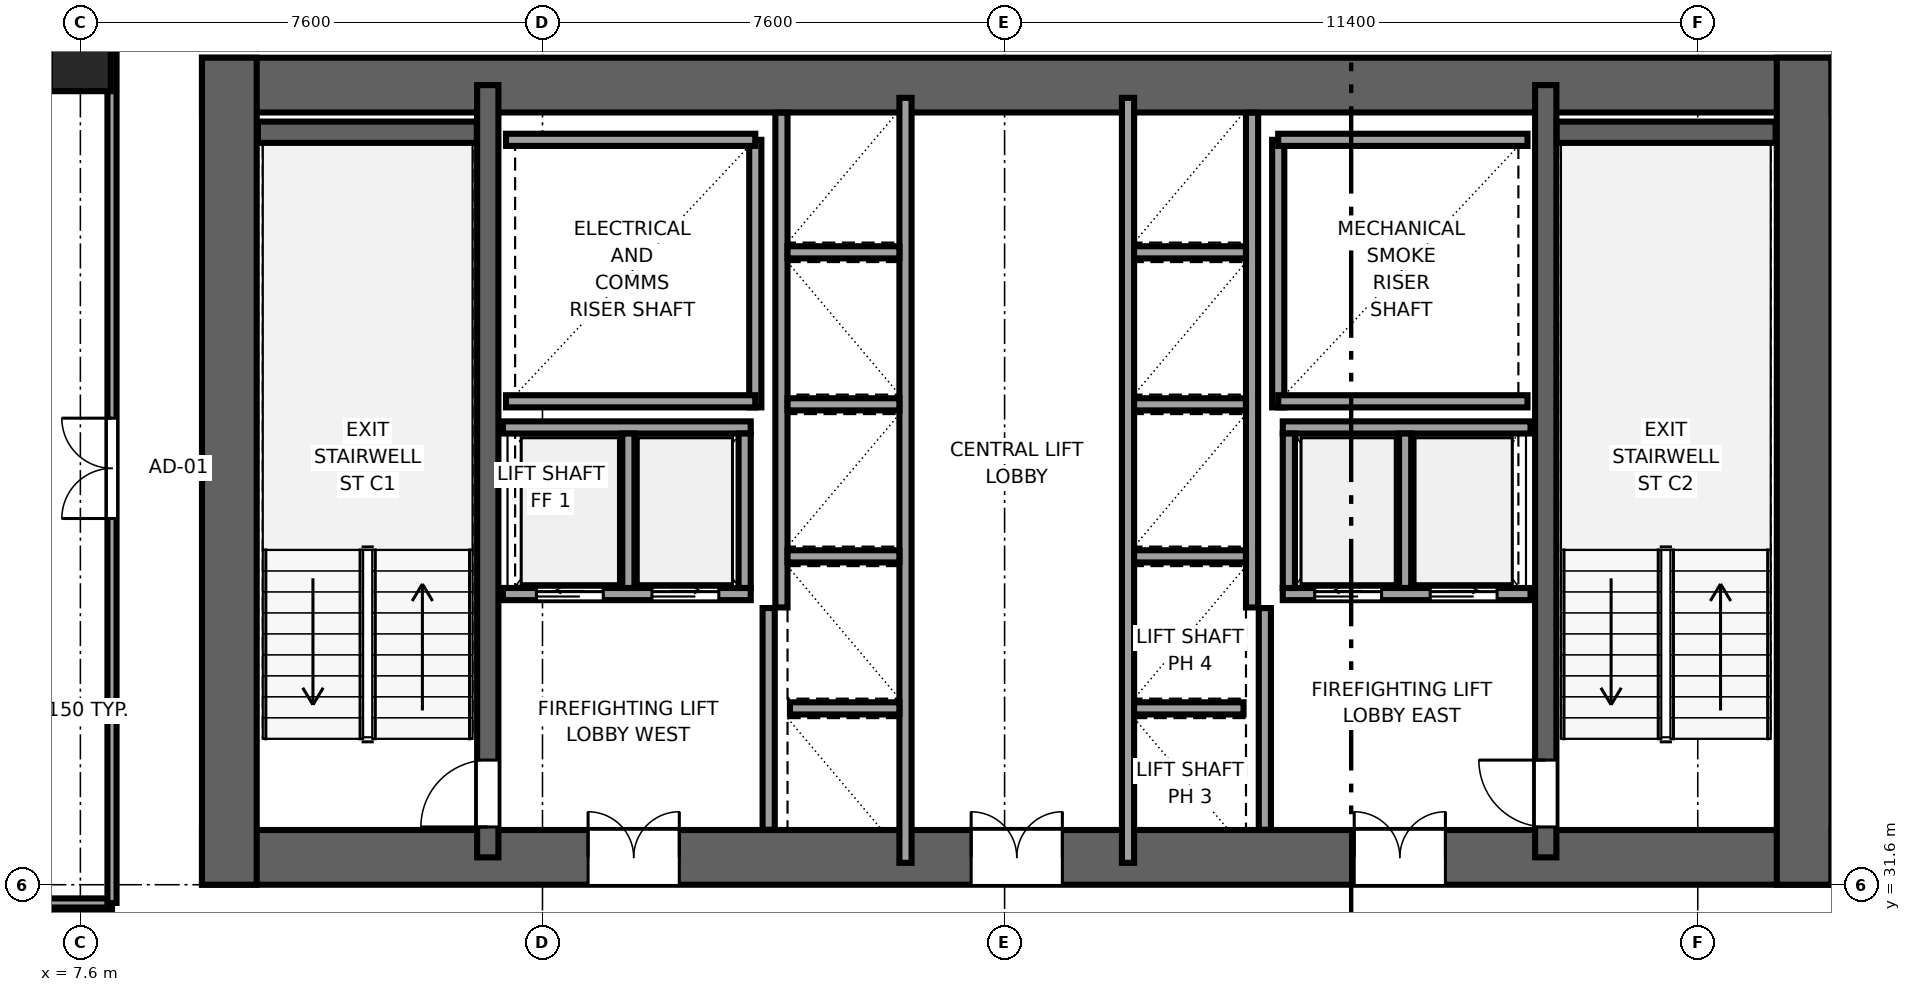
"""IFC4 building model, lengths in metres.
Left out: names, types, materials, properties, quantities, classifications, styles, units other than length and angle.
Written with IfcOpenShell. Run it as: python <this file> out.ifc"""

import sys

from ifc_helpers import new_model, si_unit, direction, frame, frame_2d, origin, origin_2d, place, context, subcontext, project, spatial, rectangle, extrude, source, transform, mapped, element, fill, save


model = new_model("IFC4")
c1 = context("Model", 3, precision=1e-05, world=origin(), true_north=direction((0.0, 1.0)))
c2 = subcontext(c1, "Body", "Model", "MODEL_VIEW")
j1 = project(units=[si_unit("LENGTHUNIT", "METRE"), si_unit("PLANEANGLEUNIT", "RADIAN")], contexts=[c1])
p1 = place(None, origin())
s1 = spatial("IfcSite", under=j1, at=p1, CompositionType="ELEMENT")
p2 = place(p1, origin())
s2 = spatial("IfcBuilding", under=s1, at=p2, CompositionType="ELEMENT")
p3 = place(p2, frame((0.0, 0.0, 53.3)))
s3 = spatial("IfcBuildingStorey", under=s2, at=p3, CompositionType="ELEMENT", Elevation=53.3)
p4 = place(p3, frame((9.6, 32.05, 0.0), z_axis=(0.0, 0.0, 1.0), x_axis=(1.0, 0.0, 0.0)))
e1 = element("IfcWall", 1, at=p4, inside=s3, PredefinedType="SHEAR", context=c2, shape_type="SweptSolid", body=[
    extrude(rectangle(XDim=26.8, YDim=0.9, at=frame_2d((13.4, 0.0))), origin(), (0.0, 0.0, 1.0), 3.55),
])
p5 = place(p4, frame((7.85, 0.0, 0.0), z_axis=(0.0, 0.0, 1.0), x_axis=(-1.0, 0.0, 0.0)))
e2 = element("IfcOpeningElement", 2, at=p5, cuts=e1, PredefinedType="OPENING", context=c2, shape_type="SweptSolid", body=[
    extrude(rectangle(XDim=1.5, YDim=2.04, at=frame_2d((0.75, 1.02))), frame((0.0, 0.46, 0.0), z_axis=(0.0, -1.0, 0.0), x_axis=(1.0, 0.0, 0.0)), (0.0, 0.0, 1.0), 0.92),
])
p6 = place(p4, frame((14.15, 0.0, 0.0), z_axis=(0.0, 0.0, 1.0), x_axis=(-1.0, 0.0, 0.0)))
e3 = element("IfcOpeningElement", 3, at=p6, cuts=e1, PredefinedType="OPENING", context=c2, shape_type="SweptSolid", body=[
    extrude(rectangle(XDim=1.5, YDim=2.04, at=frame_2d((0.75, 1.02))), frame((0.0, 0.46, 0.0), z_axis=(0.0, -1.0, 0.0), x_axis=(1.0, 0.0, 0.0)), (0.0, 0.0, 1.0), 0.92),
])
p7 = place(p4, frame((20.45, 0.0, 0.0), z_axis=(0.0, 0.0, 1.0), x_axis=(-1.0, 0.0, 0.0)))
e4 = element("IfcOpeningElement", 4, at=p7, cuts=e1, PredefinedType="OPENING", context=c2, shape_type="SweptSolid", body=[
    extrude(rectangle(XDim=1.5, YDim=2.04, at=frame_2d((0.75, 1.02))), frame((0.0, 0.46, 0.0), z_axis=(0.0, -1.0, 0.0), x_axis=(1.0, 0.0, 0.0)), (0.0, 0.0, 1.0), 0.92),
])
p8 = place(p3, frame((9.6, 44.75, 0.0), z_axis=(0.0, 0.0, 1.0), x_axis=(1.0, 0.0, 0.0)))
e5 = element("IfcWall", 5, at=p8, inside=s3, PredefinedType="SHEAR", context=c2, shape_type="SweptSolid", body=[
    extrude(rectangle(XDim=26.8, YDim=0.9, at=frame_2d((13.4, 0.0))), origin(), (0.0, 0.0, 1.0), 3.55),
])
for number, where, z_axis, x_axis in (
    (6, (10.05, 31.6, 0.0), (0.0, 0.0, 1.0), (0.0, 1.0, 0.0)),
    (7, (35.95, 31.6, 0.0), (0.0, 0.0, 1.0), (0.0, 1.0, 0.0)),
):
    element("IfcWall", number, at=place(p3, frame(where, z_axis=z_axis, x_axis=x_axis)), inside=s3, PredefinedType="SHEAR", context=c2, shape_type="SweptSolid", body=[
        extrude(rectangle(XDim=13.6, YDim=0.9, at=frame_2d((6.8, 0.0))), origin(), (0.0, 0.0, 1.0), 3.55),
    ])
p9 = place(p3, frame((14.3, 32.05, 0.0), z_axis=(0.0, 0.0, 1.0), x_axis=(0.0, 1.0, 0.0)))
e8 = element("IfcWall", 8, at=p9, inside=s3, PredefinedType="SHEAR", context=c2, shape_type="SweptSolid", body=[
    extrude(rectangle(XDim=12.7, YDim=0.35, at=frame_2d((6.35, 0.0))), origin(), (0.0, 0.0, 1.0), 3.55),
])
p10 = place(p9, frame((0.5, 0.0, 0.0)))
e9 = element("IfcOpeningElement", 9, at=p10, cuts=e8, PredefinedType="OPENING", context=c2, shape_type="SweptSolid", body=[
    extrude(rectangle(XDim=1.1, YDim=2.12, at=frame_2d((0.55, 1.06))), frame((0.0, 0.185, 0.0), z_axis=(0.0, -1.0, 0.0), x_axis=(1.0, 0.0, 0.0)), (0.0, 0.0, 1.0), 0.37),
])
p11 = place(p3, frame((31.7, 32.05, 0.0), z_axis=(0.0, 0.0, 1.0), x_axis=(0.0, 1.0, 0.0)))
e10 = element("IfcWall", 10, at=p11, inside=s3, PredefinedType="SHEAR", context=c2, shape_type="SweptSolid", body=[
    extrude(rectangle(XDim=12.7, YDim=0.35, at=frame_2d((6.35, 0.0))), origin(), (0.0, 0.0, 1.0), 3.55),
])
p12 = place(p11, frame((1.6, 0.0, 0.0), z_axis=(0.0, 0.0, 1.0), x_axis=(-1.0, 0.0, 0.0)))
e11 = element("IfcOpeningElement", 11, at=p12, cuts=e10, PredefinedType="OPENING", context=c2, shape_type="SweptSolid", body=[
    extrude(rectangle(XDim=1.1, YDim=2.12, at=frame_2d((0.55, 1.06))), frame((0.0, 0.185, 0.0), z_axis=(0.0, -1.0, 0.0), x_axis=(1.0, 0.0, 0.0)), (0.0, 0.0, 1.0), 0.37),
])
for number, where, z_axis, x_axis in (
    (12, (10.52, 43.975, 0.0), (0.0, 0.0, 1.0), (1.0, 0.0, 0.0)),
    (13, (31.88, 43.975, 0.0), (0.0, 0.0, 1.0), (1.0, 0.0, 0.0)),
):
    element("IfcWall", number, at=place(p3, frame(where, z_axis=z_axis, x_axis=x_axis)), inside=s3, PredefinedType="SHEAR", context=c2, shape_type="SweptSolid", body=[
        extrude(rectangle(XDim=3.6, YDim=0.35, at=frame_2d((1.8, 0.0))), origin(), (0.0, 0.0, 1.0), 3.55),
    ])
m1 = source(origin(), c2, "Body", "SweptSolid", [
    extrude(rectangle(XDim=1.0, YDim=1.0, at=origin_2d()), origin(), (0.0, 0.0, 1.0), 3.55),
])
p13 = place(p3, frame((7.6, 45.15, 0.0), z_axis=(0.0, 0.0, 1.0), x_axis=(1.0, 0.0, 0.0)))
e14 = element("IfcColumn", 14, at=p13, inside=s3, PredefinedType="COLUMN", context=c2, shape_type="MappedRepresentation", body=[
    mapped(m1, transform((0.0, 0.0, 0.0), x_axis=(1.0, 0.0, 0.0), y_axis=(0.0, 1.0, 0.0), z_axis=(0.0, 0.0, 1.0), scale=1.0)),
])
p14 = place(p3, frame((18.7, 39.45, 0.0), z_axis=(0.0, 0.0, 1.0), x_axis=(0.0, 1.0, 0.0)))
e15 = element("IfcWall", 15, at=p14, inside=s3, PredefinedType="SOLIDWALL", context=c2, shape_type="SweptSolid", body=[
    extrude(rectangle(XDim=4.4, YDim=0.2, at=frame_2d((2.2, 0.0))), origin(), (0.0, 0.0, 1.0), 3.37),
])
for number, where, z_axis, x_axis in (
    (16, (14.6, 39.55, 0.0), (0.0, 0.0, 1.0), (1.0, 0.0, 0.0)),
    (17, (14.6, 43.85, 0.0), (0.0, 0.0, 1.0), (1.0, 0.0, 0.0)),
):
    element("IfcWall", number, at=place(p3, frame(where, z_axis=z_axis, x_axis=x_axis)), inside=s3, PredefinedType="SOLIDWALL", context=c2, shape_type="SweptSolid", body=[
        extrude(rectangle(XDim=4.1, YDim=0.2, at=frame_2d((2.05, 0.0))), origin(), (0.0, 0.0, 1.0), 3.37),
    ])
p15 = place(p3, frame((27.3, 39.45, 0.0), z_axis=(0.0, 0.0, 1.0), x_axis=(0.0, 1.0, 0.0)))
e18 = element("IfcWall", 18, at=p15, inside=s3, PredefinedType="SOLIDWALL", context=c2, shape_type="SweptSolid", body=[
    extrude(rectangle(XDim=4.4, YDim=0.2, at=frame_2d((2.2, 0.0))), origin(), (0.0, 0.0, 1.0), 3.37),
])
for number, where, z_axis, x_axis in (
    (19, (27.3, 39.55, 0.0), (0.0, 0.0, 1.0), (1.0, 0.0, 0.0)),
    (20, (27.3, 43.85, 0.0), (0.0, 0.0, 1.0), (1.0, 0.0, 0.0)),
):
    element("IfcWall", number, at=place(p3, frame(where, z_axis=z_axis, x_axis=x_axis)), inside=s3, PredefinedType="SOLIDWALL", context=c2, shape_type="SweptSolid", body=[
        extrude(rectangle(XDim=4.1, YDim=0.2, at=frame_2d((2.05, 0.0))), origin(), (0.0, 0.0, 1.0), 3.37),
    ])
for number, where, z_axis, x_axis in (
    (21, (18.92, 32.504, 0.0), (0.0, 0.0, 1.0), (0.0, 1.0, 0.0)),
    (22, (27.08, 32.504, 0.0), (0.0, 0.0, 1.0), (0.0, 1.0, 0.0)),
):
    element("IfcWall", number, at=place(p3, frame(where, z_axis=z_axis, x_axis=x_axis)), inside=s3, PredefinedType="SOLIDWALL", context=c2, shape_type="SweptSolid", body=[
        extrude(rectangle(XDim=3.646, YDim=0.2, at=frame_2d((1.823, 0.0))), origin(), (0.0, 0.0, 1.0), 3.37),
    ])
p16 = place(p3, frame((21.17, 31.96, 0.0), z_axis=(0.0, 0.0, 1.0), x_axis=(0.0, 1.0, 0.0)))
e23 = element("IfcWall", 23, at=p16, inside=s3, PredefinedType="SOLIDWALL", context=c2, shape_type="SweptSolid", body=[
    extrude(rectangle(XDim=12.58, YDim=0.2, at=frame_2d((6.29, 0.0))), origin(), (0.0, 0.0, 1.0), 3.37),
])
p17 = place(p3, frame((19.13, 36.16, 0.0), z_axis=(0.0, 0.0, 1.0), x_axis=(0.0, 1.0, 0.0)))
e24 = element("IfcWall", 24, at=p17, inside=s3, PredefinedType="SOLIDWALL", context=c2, shape_type="SweptSolid", body=[
    extrude(rectangle(XDim=8.136, YDim=0.2, at=frame_2d((4.068, 0.0))), origin(), (0.0, 0.0, 1.0), 3.37),
])
p18 = place(p3, frame((19.27, 34.5, 0.0), z_axis=(0.0, 0.0, 1.0), x_axis=(1.0, 0.0, 0.0)))
e25 = element("IfcWall", 25, at=p18, inside=s3, PredefinedType="SOLIDWALL", context=c2, shape_type="SweptSolid", body=[
    extrude(rectangle(XDim=1.8, YDim=0.2, at=frame_2d((0.9, 0.0))), origin(), (0.0, 0.0, 1.0), 3.37),
])
for number, where, z_axis, x_axis in (
    (26, (19.23, 37.0, 0.0), (0.0, 0.0, 1.0), (1.0, 0.0, 0.0)),
    (27, (19.23, 39.5, 0.0), (0.0, 0.0, 1.0), (1.0, 0.0, 0.0)),
    (28, (19.23, 42.0, 0.0), (0.0, 0.0, 1.0), (1.0, 0.0, 0.0)),
):
    element("IfcWall", number, at=place(p3, frame(where, z_axis=z_axis, x_axis=x_axis)), inside=s3, PredefinedType="SOLIDWALL", context=c2, shape_type="SweptSolid", body=[
        extrude(rectangle(XDim=1.84, YDim=0.2, at=frame_2d((0.92, 0.0))), origin(), (0.0, 0.0, 1.0), 3.37),
    ])
p19 = place(p3, frame((27.375, 36.38, 0.0), z_axis=(0.0, 0.0, 1.0), x_axis=(1.0, 0.0, 0.0)))
e29 = element("IfcWall", 29, at=p19, inside=s3, PredefinedType="SOLIDWALL", context=c2, shape_type="SweptSolid", body=[
    extrude(rectangle(XDim=4.075, YDim=0.2, at=frame_2d((2.038, 0.0))), origin(), (0.0, 0.0, 1.0), 3.37),
])
p20 = place(p19, frame((0.525, 0.0, 0.0)))
e30 = element("IfcOpeningElement", 30, at=p20, cuts=e29, PredefinedType="OPENING", context=c2, shape_type="SweptSolid", body=[
    extrude(rectangle(XDim=1.1, YDim=2.12, at=frame_2d((0.55, 1.06))), frame((0.0, 0.11, 0.0), z_axis=(0.0, -1.0, 0.0), x_axis=(1.0, 0.0, 0.0)), (0.0, 0.0, 1.0), 0.22),
])
p21 = place(p19, frame((2.425, 0.0, 0.0)))
e31 = element("IfcOpeningElement", 31, at=p21, cuts=e29, PredefinedType="OPENING", context=c2, shape_type="SweptSolid", body=[
    extrude(rectangle(XDim=1.1, YDim=2.12, at=frame_2d((0.55, 1.06))), frame((0.0, 0.11, 0.0), z_axis=(0.0, -1.0, 0.0), x_axis=(1.0, 0.0, 0.0)), (0.0, 0.0, 1.0), 0.22),
])
p22 = place(p3, frame((27.375, 39.12, 0.0), z_axis=(0.0, 0.0, 1.0), x_axis=(1.0, 0.0, 0.0)))
e32 = element("IfcWall", 32, at=p22, inside=s3, PredefinedType="SOLIDWALL", context=c2, shape_type="SweptSolid", body=[
    extrude(rectangle(XDim=4.075, YDim=0.2, at=frame_2d((2.038, 0.0))), origin(), (0.0, 0.0, 1.0), 3.37),
])
for number, where, z_axis, x_axis in (
    (33, (27.475, 36.48, 0.0), (0.0, 0.0, 1.0), (0.0, 1.0, 0.0)),
    (34, (29.387, 36.48, 0.0), (0.0, 0.0, 1.0), (0.0, 1.0, 0.0)),
):
    element("IfcWall", number, at=place(p3, frame(where, z_axis=z_axis, x_axis=x_axis)), inside=s3, PredefinedType="SOLIDWALL", context=c2, shape_type="SweptSolid", body=[
        extrude(rectangle(XDim=2.54, YDim=0.2, at=frame_2d((1.27, 0.0))), origin(), (0.0, 0.0, 1.0), 3.37),
    ])
p23 = place(p3, frame((14.55, 36.38, 0.0), z_axis=(0.0, 0.0, 1.0), x_axis=(1.0, 0.0, 0.0)))
e35 = element("IfcWall", 35, at=p23, inside=s3, PredefinedType="SOLIDWALL", context=c2, shape_type="SweptSolid", body=[
    extrude(rectangle(XDim=4.075, YDim=0.2, at=frame_2d((2.038, 0.0))), origin(), (0.0, 0.0, 1.0), 3.37),
])
p24 = place(p23, frame((0.55, 0.0, 0.0)))
e36 = element("IfcOpeningElement", 36, at=p24, cuts=e35, PredefinedType="OPENING", context=c2, shape_type="SweptSolid", body=[
    extrude(rectangle(XDim=1.1, YDim=2.12, at=frame_2d((0.55, 1.06))), frame((0.0, 0.11, 0.0), z_axis=(0.0, -1.0, 0.0), x_axis=(1.0, 0.0, 0.0)), (0.0, 0.0, 1.0), 0.22),
])
p25 = place(p23, frame((2.45, 0.0, 0.0)))
e37 = element("IfcOpeningElement", 37, at=p25, cuts=e35, PredefinedType="OPENING", context=c2, shape_type="SweptSolid", body=[
    extrude(rectangle(XDim=1.1, YDim=2.12, at=frame_2d((0.55, 1.06))), frame((0.0, 0.11, 0.0), z_axis=(0.0, -1.0, 0.0), x_axis=(1.0, 0.0, 0.0)), (0.0, 0.0, 1.0), 0.22),
])
p26 = place(p3, frame((14.55, 39.12, 0.0), z_axis=(0.0, 0.0, 1.0), x_axis=(1.0, 0.0, 0.0)))
e38 = element("IfcWall", 38, at=p26, inside=s3, PredefinedType="SOLIDWALL", context=c2, shape_type="SweptSolid", body=[
    extrude(rectangle(XDim=4.075, YDim=0.2, at=frame_2d((2.038, 0.0))), origin(), (0.0, 0.0, 1.0), 3.37),
])
for number, where, z_axis, x_axis in (
    (39, (18.525, 36.48, 0.0), (0.0, 0.0, 1.0), (0.0, 1.0, 0.0)),
    (40, (16.613, 36.48, 0.0), (0.0, 0.0, 1.0), (0.0, 1.0, 0.0)),
):
    element("IfcWall", number, at=place(p3, frame(where, z_axis=z_axis, x_axis=x_axis)), inside=s3, PredefinedType="SOLIDWALL", context=c2, shape_type="SweptSolid", body=[
        extrude(rectangle(XDim=2.54, YDim=0.2, at=frame_2d((1.27, 0.0))), origin(), (0.0, 0.0, 1.0), 3.37),
    ])
p27 = place(p3, frame((24.83, 31.96, 0.0), z_axis=(0.0, 0.0, 1.0), x_axis=(0.0, 1.0, 0.0)))
e41 = element("IfcWall", 41, at=p27, inside=s3, PredefinedType="SOLIDWALL", context=c2, shape_type="SweptSolid", body=[
    extrude(rectangle(XDim=12.58, YDim=0.2, at=frame_2d((6.29, 0.0))), origin(), (0.0, 0.0, 1.0), 3.37),
])
p28 = place(p3, frame((26.87, 36.16, 0.0), z_axis=(0.0, 0.0, 1.0), x_axis=(0.0, 1.0, 0.0)))
e42 = element("IfcWall", 42, at=p28, inside=s3, PredefinedType="SOLIDWALL", context=c2, shape_type="SweptSolid", body=[
    extrude(rectangle(XDim=8.136, YDim=0.2, at=frame_2d((4.068, 0.0))), origin(), (0.0, 0.0, 1.0), 3.37),
])
p29 = place(p3, frame((24.93, 34.5, 0.0), z_axis=(0.0, 0.0, 1.0), x_axis=(1.0, 0.0, 0.0)))
e43 = element("IfcWall", 43, at=p29, inside=s3, PredefinedType="SOLIDWALL", context=c2, shape_type="SweptSolid", body=[
    extrude(rectangle(XDim=1.8, YDim=0.2, at=frame_2d((0.9, 0.0))), origin(), (0.0, 0.0, 1.0), 3.37),
])
for number, where, z_axis, x_axis in (
    (44, (24.93, 37.0, 0.0), (0.0, 0.0, 1.0), (1.0, 0.0, 0.0)),
    (45, (24.93, 39.5, 0.0), (0.0, 0.0, 1.0), (1.0, 0.0, 0.0)),
    (46, (24.93, 42.0, 0.0), (0.0, 0.0, 1.0), (1.0, 0.0, 0.0)),
):
    element("IfcWall", number, at=place(p3, frame(where, z_axis=z_axis, x_axis=x_axis)), inside=s3, PredefinedType="SOLIDWALL", context=c2, shape_type="SweptSolid", body=[
        extrude(rectangle(XDim=1.84, YDim=0.2, at=frame_2d((0.92, 0.0))), origin(), (0.0, 0.0, 1.0), 3.37),
    ])
p30 = place(p3, frame((0.3, 31.1, 0.0), z_axis=(0.0, 0.0, 1.0), x_axis=(1.0, 0.0, 0.0)))
e47 = element("IfcWall", 47, at=p30, inside=s3, PredefinedType="PARTITIONING", context=c2, shape_type="SweptSolid", body=[
    extrude(rectangle(XDim=7.82, YDim=0.18, at=frame_2d((3.91, 0.0))), origin(), (0.0, 0.0, 1.0), 3.37),
])
p31 = place(p3, frame((0.3, 31.3, 0.0), z_axis=(0.0, 0.0, 1.0), x_axis=(1.0, 0.0, 0.0)))
e48 = element("IfcWall", 48, at=p31, inside=s3, PredefinedType="PARTITIONING", context=c2, shape_type="SweptSolid", body=[
    extrude(rectangle(XDim=7.82, YDim=0.15, at=frame_2d((3.91, 0.0))), origin(), (0.0, 0.0, 1.0), 3.37),
])
p32 = place(p3, frame((8.12, 31.3, 0.0), z_axis=(0.0, 0.0, 1.0), x_axis=(0.0, 1.0, 0.0)))
e49 = element("IfcWall", 49, at=p32, inside=s3, PredefinedType="PARTITIONING", context=c2, shape_type="SweptSolid", body=[
    extrude(rectangle(XDim=14.295, YDim=0.15, at=frame_2d((7.147, 0.0))), origin(), (0.0, 0.0, 1.0), 3.37),
])
p33 = place(p32, frame((6.323, 0.0, 0.0)))
e50 = element("IfcOpeningElement", 50, at=p33, cuts=e49, PredefinedType="OPENING", context=c2, shape_type="SweptSolid", body=[
    extrude(rectangle(XDim=1.65, YDim=2.15, at=frame_2d((0.825, 1.075))), frame((0.0, 0.085, 0.0), z_axis=(0.0, -1.0, 0.0), x_axis=(1.0, 0.0, 0.0)), (0.0, 0.0, 1.0), 0.17),
])
m2 = source(origin(), c2, "Body", "SweptSolid", [
    extrude(rectangle(XDim=1.1, YDim=2.12, at=frame_2d((0.55, 1.06))), frame((0.0, 0.025, 0.0), z_axis=(0.0, -1.0, 0.0), x_axis=(1.0, 0.0, 0.0)), (0.0, 0.0, 1.0), 0.05),
])
p34 = place(p10, origin())
e51 = element("IfcDoor", 51, at=p34, inside=s3, OperationType="SINGLE_SWING_LEFT", PredefinedType="DOOR", context=c2, shape_type="MappedRepresentation", body=[
    mapped(m2, transform((0.0, 0.0, 0.0), x_axis=(1.0, 0.0, 0.0), y_axis=(0.0, 1.0, 0.0), z_axis=(0.0, 0.0, 1.0), scale=1.0)),
])
fill(e9, e51)
p35 = place(p12, origin())
e52 = element("IfcDoor", 52, at=p35, inside=s3, OperationType="SINGLE_SWING_RIGHT", PredefinedType="DOOR", context=c2, shape_type="MappedRepresentation", body=[
    mapped(m2, transform((0.0, 0.0, 0.0), x_axis=(1.0, 0.0, 0.0), y_axis=(0.0, 1.0, 0.0), z_axis=(0.0, 0.0, 1.0), scale=1.0)),
])
fill(e11, e52)
m3 = source(origin(), c2, "Body", "SweptSolid", [
    extrude(rectangle(XDim=1.5, YDim=2.04, at=frame_2d((0.75, 1.02))), frame((0.0, 0.025, 0.0), z_axis=(0.0, -1.0, 0.0), x_axis=(1.0, 0.0, 0.0)), (0.0, 0.0, 1.0), 0.05),
])
p36 = place(p5, origin())
e53 = element("IfcDoor", 53, at=p36, inside=s3, OperationType="DOUBLE_DOOR_SINGLE_SWING", PredefinedType="DOOR", context=c2, shape_type="MappedRepresentation", body=[
    mapped(m3, transform((0.0, 0.0, 0.0), x_axis=(1.0, 0.0, 0.0), y_axis=(0.0, 1.0, 0.0), z_axis=(0.0, 0.0, 1.0), scale=1.0)),
])
fill(e2, e53)
p37 = place(p6, origin())
e54 = element("IfcDoor", 54, at=p37, inside=s3, OperationType="DOUBLE_DOOR_SINGLE_SWING", PredefinedType="DOOR", context=c2, shape_type="MappedRepresentation", body=[
    mapped(m3, transform((0.0, 0.0, 0.0), x_axis=(1.0, 0.0, 0.0), y_axis=(0.0, 1.0, 0.0), z_axis=(0.0, 0.0, 1.0), scale=1.0)),
])
fill(e3, e54)
p38 = place(p7, origin())
e55 = element("IfcDoor", 55, at=p38, inside=s3, OperationType="DOUBLE_DOOR_SINGLE_SWING", PredefinedType="DOOR", context=c2, shape_type="MappedRepresentation", body=[
    mapped(m3, transform((0.0, 0.0, 0.0), x_axis=(1.0, 0.0, 0.0), y_axis=(0.0, 1.0, 0.0), z_axis=(0.0, 0.0, 1.0), scale=1.0)),
])
fill(e4, e55)
m4 = source(origin(), c2, "Body", "SweptSolid", [
    extrude(rectangle(XDim=1.1, YDim=2.12, at=frame_2d((0.55, 1.06))), frame((0.0, 0.025, 0.0), z_axis=(0.0, -1.0, 0.0), x_axis=(1.0, 0.0, 0.0)), (0.0, 0.0, 1.0), 0.05),
])
p39 = place(p20, origin())
e56 = element("IfcDoor", 56, at=p39, inside=s3, OperationType="SLIDING_TO_LEFT", PredefinedType="DOOR", context=c2, shape_type="MappedRepresentation", body=[
    mapped(m4, transform((0.0, 0.0, 0.0), x_axis=(1.0, 0.0, 0.0), y_axis=(0.0, 1.0, 0.0), z_axis=(0.0, 0.0, 1.0), scale=1.0)),
])
fill(e30, e56)
p40 = place(p21, origin())
e57 = element("IfcDoor", 57, at=p40, inside=s3, OperationType="SLIDING_TO_RIGHT", PredefinedType="DOOR", context=c2, shape_type="MappedRepresentation", body=[
    mapped(m4, transform((0.0, 0.0, 0.0), x_axis=(1.0, 0.0, 0.0), y_axis=(0.0, 1.0, 0.0), z_axis=(0.0, 0.0, 1.0), scale=1.0)),
])
fill(e31, e57)
p41 = place(p24, origin())
e58 = element("IfcDoor", 58, at=p41, inside=s3, OperationType="SLIDING_TO_LEFT", PredefinedType="DOOR", context=c2, shape_type="MappedRepresentation", body=[
    mapped(m4, transform((0.0, 0.0, 0.0), x_axis=(1.0, 0.0, 0.0), y_axis=(0.0, 1.0, 0.0), z_axis=(0.0, 0.0, 1.0), scale=1.0)),
])
fill(e36, e58)
p42 = place(p25, origin())
e59 = element("IfcDoor", 59, at=p42, inside=s3, OperationType="SLIDING_TO_RIGHT", PredefinedType="DOOR", context=c2, shape_type="MappedRepresentation", body=[
    mapped(m4, transform((0.0, 0.0, 0.0), x_axis=(1.0, 0.0, 0.0), y_axis=(0.0, 1.0, 0.0), z_axis=(0.0, 0.0, 1.0), scale=1.0)),
])
fill(e37, e59)
m5 = source(origin(), c2, "Body", "SweptSolid", [
    extrude(rectangle(XDim=1.65, YDim=2.15, at=frame_2d((0.825, 1.075))), frame((0.0, 0.025, 0.0), z_axis=(0.0, -1.0, 0.0), x_axis=(1.0, 0.0, 0.0)), (0.0, 0.0, 1.0), 0.05),
])
p43 = place(p33, origin())
e60 = element("IfcDoor", 60, at=p43, inside=s3, OperationType="DOUBLE_DOOR_SINGLE_SWING", PredefinedType="DOOR", context=c2, shape_type="MappedRepresentation", body=[
    mapped(m5, transform((0.0, 0.0, 0.0), x_axis=(1.0, 0.0, 0.0), y_axis=(0.0, 1.0, 0.0), z_axis=(0.0, 0.0, 1.0), scale=1.0)),
])
fill(e50, e60)
save(model, sys.argv[1])
